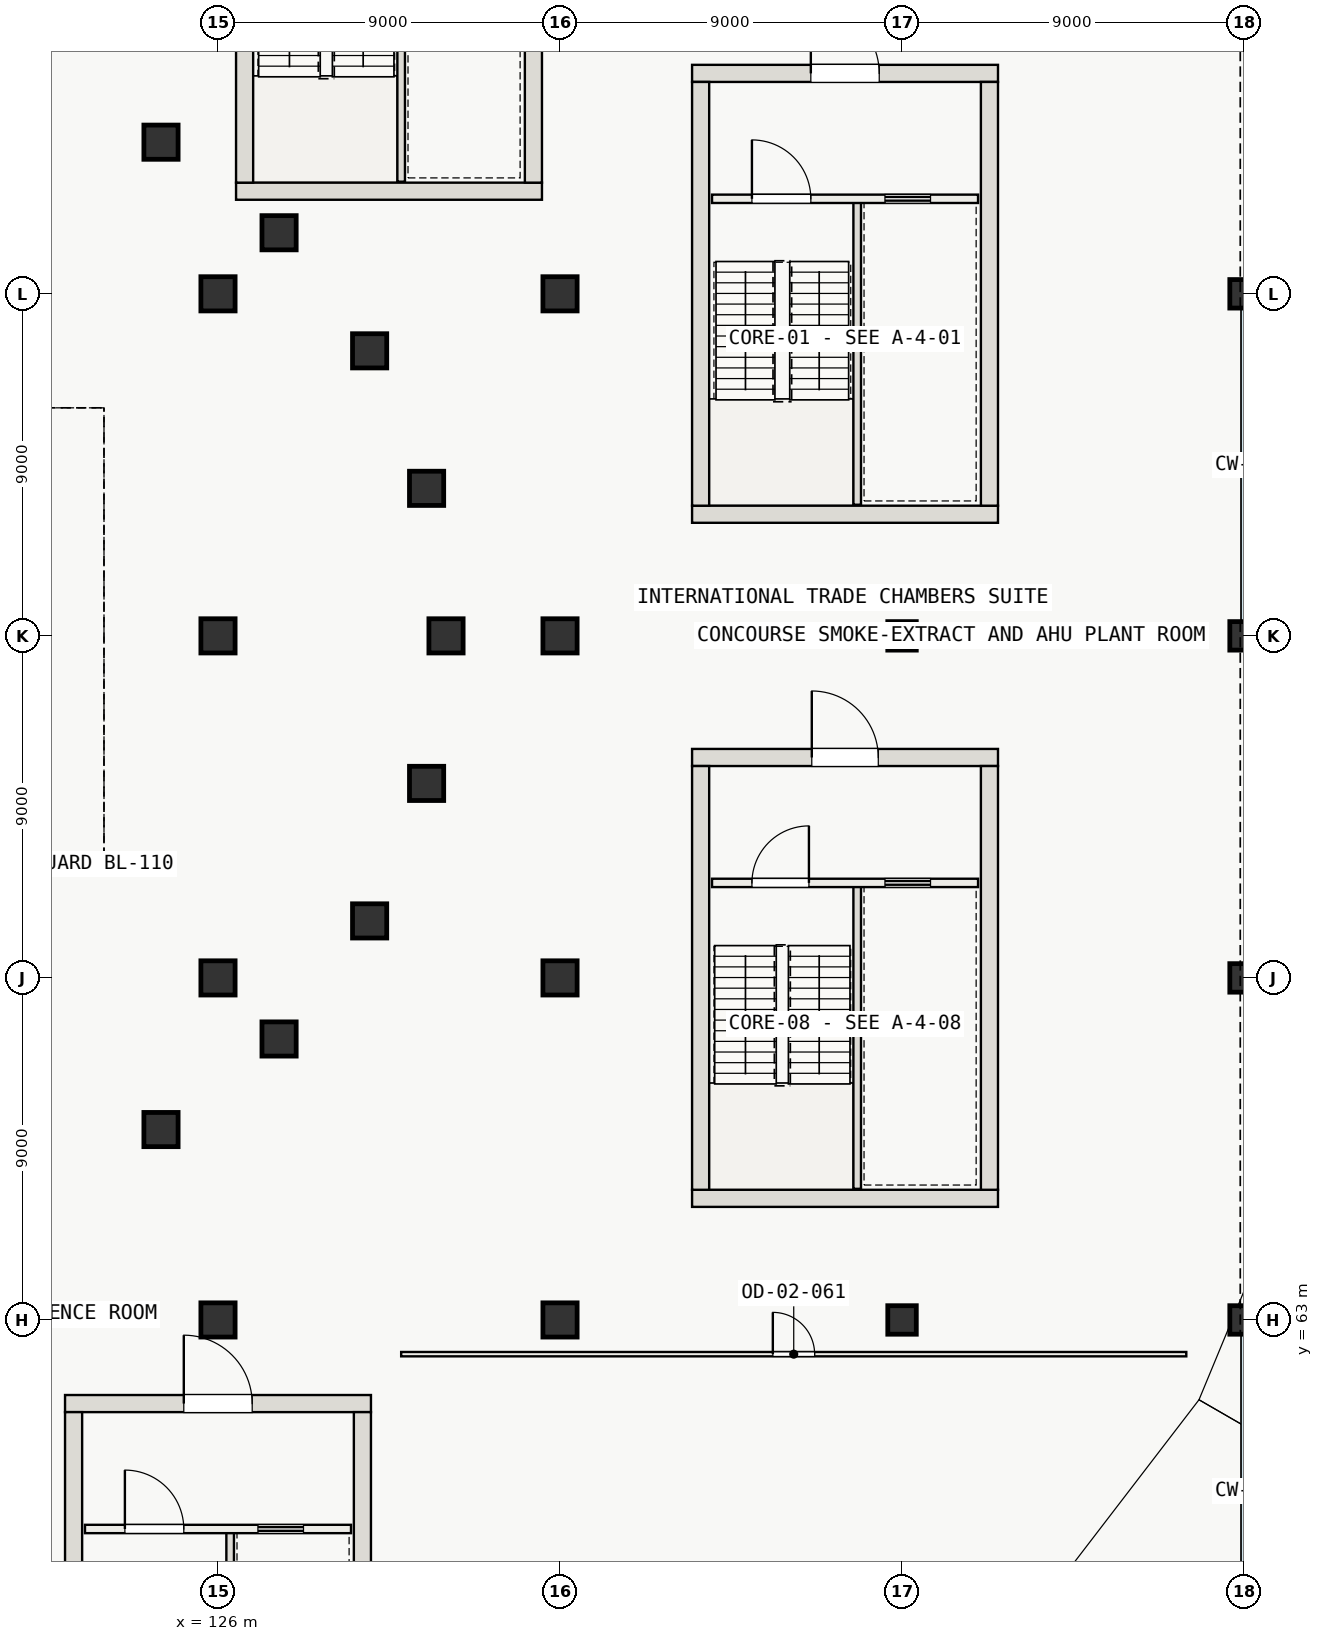
"""IFC4 building model, lengths in metres.
Left out: names, types, materials, properties, quantities, classifications, styles, units other than length and angle.
Written with IfcOpenShell. Run it as: python <this file> out.ifc"""

import sys

from ifc_helpers import new_model, si_unit, direction, frame, frame_2d, origin, origin_2d, place, context, subcontext, project, spatial, rectangle, circle, extrude, element, fill, save


model = new_model("IFC4")
c1 = context("Model", 3, precision=1e-05, world=origin(), true_north=direction((0.0, 1.0)))
c2 = subcontext(c1, "Body", "Model", "MODEL_VIEW")
j1 = project(units=[si_unit("LENGTHUNIT", "METRE"), si_unit("PLANEANGLEUNIT", "RADIAN")], contexts=[c1])
p1 = place(None, origin())
s1 = spatial("IfcSite", under=j1, at=p1, CompositionType="ELEMENT")
p2 = place(p1, origin())
s2 = spatial("IfcBuilding", under=s1, at=p2, CompositionType="ELEMENT")
p3 = place(p2, frame((0.0, 0.0, 16.8)))
s3 = spatial("IfcBuildingStorey", under=s2, at=p3, CompositionType="ELEMENT", Elevation=16.8)
p4 = place(p3, frame((138.475, 84.2, 0.0), z_axis=(0.0, 0.0, 1.0), x_axis=(1.0, 0.0, 0.0)))
e1 = element("IfcWall", 1, at=p4, inside=s3, PredefinedType="SHEAR", context=c2, shape_type="SweptSolid", body=[
    extrude(rectangle(XDim=8.05, YDim=0.45, at=frame_2d((4.025, 0.0))), origin(), (0.0, 0.0, 1.0), 4.8),
])
p5 = place(p3, frame((138.475, 95.8, 0.0), z_axis=(0.0, 0.0, 1.0), x_axis=(1.0, 0.0, 0.0)))
e2 = element("IfcWall", 2, at=p5, inside=s3, PredefinedType="SHEAR", context=c2, shape_type="SweptSolid", body=[
    extrude(rectangle(XDim=8.05, YDim=0.45, at=frame_2d((4.025, 0.0))), origin(), (0.0, 0.0, 1.0), 4.8),
])
p6 = place(p5, frame((3.125, 0.0, 0.0)))
e3 = element("IfcOpeningElement", 3, at=p6, cuts=e2, PredefinedType="OPENING", context=c2, shape_type="SweptSolid", body=[
    extrude(rectangle(XDim=1.8, YDim=2.3, at=frame_2d((0.9, 1.15))), frame((0.0, 0.235, 0.0), z_axis=(0.0, -1.0, 0.0), x_axis=(1.0, 0.0, 0.0)), (0.0, 0.0, 1.0), 0.47),
])
for number, where, z_axis, x_axis in (
    (4, (138.7, 84.425, 0.0), (0.0, 0.0, 1.0), (0.0, 1.0, 0.0)),
    (5, (146.3, 84.425, 0.0), (0.0, 0.0, 1.0), (0.0, 1.0, 0.0)),
):
    element("IfcWall", number, at=place(p3, frame(where, z_axis=z_axis, x_axis=x_axis)), inside=s3, PredefinedType="SHEAR", context=c2, shape_type="SweptSolid", body=[
        extrude(rectangle(XDim=11.15, YDim=0.45, at=frame_2d((5.575, 0.0))), origin(), (0.0, 0.0, 1.0), 4.8),
    ])
p7 = place(p3, frame((126.475, 92.7, 0.0), z_axis=(0.0, 0.0, 1.0), x_axis=(1.0, 0.0, 0.0)))
e6 = element("IfcWall", 6, at=p7, inside=s3, PredefinedType="SHEAR", context=c2, shape_type="SweptSolid", body=[
    extrude(rectangle(XDim=8.05, YDim=0.45, at=frame_2d((4.025, 0.0))), origin(), (0.0, 0.0, 1.0), 4.8),
])
for number, where, z_axis, x_axis in (
    (7, (126.7, 92.925, 0.0), (0.0, 0.0, 1.0), (0.0, 1.0, 0.0)),
    (8, (134.3, 92.925, 0.0), (0.0, 0.0, 1.0), (0.0, 1.0, 0.0)),
):
    element("IfcWall", number, at=place(p3, frame(where, z_axis=z_axis, x_axis=x_axis)), inside=s3, PredefinedType="SHEAR", context=c2, shape_type="SweptSolid", body=[
        extrude(rectangle(XDim=11.15, YDim=0.45, at=frame_2d((5.575, 0.0))), origin(), (0.0, 0.0, 1.0), 4.8),
    ])
p8 = place(p3, frame((121.975, 60.8, 0.0), z_axis=(0.0, 0.0, 1.0), x_axis=(1.0, 0.0, 0.0)))
e9 = element("IfcWall", 9, at=p8, inside=s3, PredefinedType="SHEAR", context=c2, shape_type="SweptSolid", body=[
    extrude(rectangle(XDim=8.05, YDim=0.45, at=frame_2d((4.025, 0.0))), origin(), (0.0, 0.0, 1.0), 4.8),
])
p9 = place(p8, frame((3.125, 0.0, 0.0)))
e10 = element("IfcOpeningElement", 10, at=p9, cuts=e9, PredefinedType="OPENING", context=c2, shape_type="SweptSolid", body=[
    extrude(rectangle(XDim=1.8, YDim=2.3, at=frame_2d((0.9, 1.15))), frame((0.0, 0.235, 0.0), z_axis=(0.0, -1.0, 0.0), x_axis=(1.0, 0.0, 0.0)), (0.0, 0.0, 1.0), 0.47),
])
for number, where, z_axis, x_axis in (
    (11, (122.2, 49.425, 0.0), (0.0, 0.0, 1.0), (0.0, 1.0, 0.0)),
    (12, (129.8, 49.425, 0.0), (0.0, 0.0, 1.0), (0.0, 1.0, 0.0)),
):
    element("IfcWall", number, at=place(p3, frame(where, z_axis=z_axis, x_axis=x_axis)), inside=s3, PredefinedType="SHEAR", context=c2, shape_type="SweptSolid", body=[
        extrude(rectangle(XDim=11.15, YDim=0.45, at=frame_2d((5.575, 0.0))), origin(), (0.0, 0.0, 1.0), 4.8),
    ])
p10 = place(p3, frame((138.475, 66.2, 0.0), z_axis=(0.0, 0.0, 1.0), x_axis=(1.0, 0.0, 0.0)))
e13 = element("IfcWall", 13, at=p10, inside=s3, PredefinedType="SHEAR", context=c2, shape_type="SweptSolid", body=[
    extrude(rectangle(XDim=8.05, YDim=0.45, at=frame_2d((4.025, 0.0))), origin(), (0.0, 0.0, 1.0), 4.8),
])
p11 = place(p3, frame((138.475, 77.8, 0.0), z_axis=(0.0, 0.0, 1.0), x_axis=(1.0, 0.0, 0.0)))
e14 = element("IfcWall", 14, at=p11, inside=s3, PredefinedType="SHEAR", context=c2, shape_type="SweptSolid", body=[
    extrude(rectangle(XDim=8.05, YDim=0.45, at=frame_2d((4.025, 0.0))), origin(), (0.0, 0.0, 1.0), 4.8),
])
p12 = place(p11, frame((3.15, 0.0, 0.0)))
e15 = element("IfcOpeningElement", 15, at=p12, cuts=e14, PredefinedType="OPENING", context=c2, shape_type="SweptSolid", body=[
    extrude(rectangle(XDim=1.75, YDim=2.3, at=frame_2d((0.875, 1.15))), frame((0.0, 0.235, 0.0), z_axis=(0.0, -1.0, 0.0), x_axis=(1.0, 0.0, 0.0)), (0.0, 0.0, 1.0), 0.47),
])
for number, where, z_axis, x_axis in (
    (16, (138.7, 66.425, 0.0), (0.0, 0.0, 1.0), (0.0, 1.0, 0.0)),
    (17, (146.3, 66.425, 0.0), (0.0, 0.0, 1.0), (0.0, 1.0, 0.0)),
):
    element("IfcWall", number, at=place(p3, frame(where, z_axis=z_axis, x_axis=x_axis)), inside=s3, PredefinedType="SHEAR", context=c2, shape_type="SweptSolid", body=[
        extrude(rectangle(XDim=11.15, YDim=0.45, at=frame_2d((5.575, 0.0))), origin(), (0.0, 0.0, 1.0), 4.8),
    ])
for number, where, z_axis, x_axis in (
    (18, (124.5, 68.01, 0.0), (0.0, 0.0, 1.0), (1.0, 0.0, 0.0)),
    (19, (124.5, 93.99, 0.0), (0.0, 0.0, 1.0), (1.0, 0.0, 0.0)),
):
    element("IfcColumn", number, at=place(p3, frame(where, z_axis=z_axis, x_axis=x_axis)), inside=s3, PredefinedType="COLUMN", context=c2, shape_type="SweptSolid", body=[
        extrude(circle(Radius=0.45, at=origin_2d()), origin(), (0.0, 0.0, 1.0), 4.45),
    ])
for number, where, z_axis, x_axis in (
    (20, (126.0, 63.0, 0.0), (0.0, 0.0, 1.0), (1.0, 0.0, 0.0)),
    (21, (126.0, 72.0, 0.0), (0.0, 0.0, 1.0), (1.0, 0.0, 0.0)),
    (22, (126.0, 81.0, 0.0), (0.0, 0.0, 1.0), (1.0, 0.0, 0.0)),
    (23, (126.0, 90.0, 0.0), (0.0, 0.0, 1.0), (1.0, 0.0, 0.0)),
):
    element("IfcColumn", number, at=place(p3, frame(where, z_axis=z_axis, x_axis=x_axis)), inside=s3, PredefinedType="COLUMN", context=c2, shape_type="SweptSolid", body=[
        extrude(rectangle(XDim=0.9, YDim=0.9, at=origin_2d()), origin(), (0.0, 0.0, 1.0), 4.8),
    ])
for number, where, z_axis, x_axis in (
    (24, (127.607, 70.393, 0.0), (0.0, 0.0, 1.0), (1.0, 0.0, 0.0)),
    (25, (127.607, 91.607, 0.0), (0.0, 0.0, 1.0), (1.0, 0.0, 0.0)),
    (26, (129.99, 73.5, 0.0), (0.0, 0.0, 1.0), (1.0, 0.0, 0.0)),
    (27, (129.99, 88.5, 0.0), (0.0, 0.0, 1.0), (1.0, 0.0, 0.0)),
    (28, (131.489, 77.118, 0.0), (0.0, 0.0, 1.0), (1.0, 0.0, 0.0)),
    (29, (131.489, 84.882, 0.0), (0.0, 0.0, 1.0), (1.0, 0.0, 0.0)),
    (30, (132.0, 81.0, 0.0), (0.0, 0.0, 1.0), (1.0, 0.0, 0.0)),
):
    element("IfcColumn", number, at=place(p3, frame(where, z_axis=z_axis, x_axis=x_axis)), inside=s3, PredefinedType="COLUMN", context=c2, shape_type="SweptSolid", body=[
        extrude(circle(Radius=0.45, at=origin_2d()), origin(), (0.0, 0.0, 1.0), 4.45),
    ])
for number, where, z_axis, x_axis in (
    (31, (135.0, 63.0, 0.0), (0.0, 0.0, 1.0), (1.0, 0.0, 0.0)),
    (32, (135.0, 72.0, 0.0), (0.0, 0.0, 1.0), (1.0, 0.0, 0.0)),
    (33, (135.0, 81.0, 0.0), (0.0, 0.0, 1.0), (1.0, 0.0, 0.0)),
    (34, (135.0, 90.0, 0.0), (0.0, 0.0, 1.0), (1.0, 0.0, 0.0)),
):
    element("IfcColumn", number, at=place(p3, frame(where, z_axis=z_axis, x_axis=x_axis)), inside=s3, PredefinedType="COLUMN", context=c2, shape_type="SweptSolid", body=[
        extrude(rectangle(XDim=0.9, YDim=0.9, at=origin_2d()), origin(), (0.0, 0.0, 1.0), 4.8),
    ])
for number, where, z_axis, x_axis in (
    (35, (144.0, 63.0, 0.0), (0.0, 0.0, 1.0), (1.0, 0.0, 0.0)),
    (36, (144.0, 81.0, 0.0), (0.0, 0.0, 1.0), (1.0, 0.0, 0.0)),
    (37, (153.0, 63.0, 0.0), (0.0, 0.0, 1.0), (1.0, 0.0, 0.0)),
    (38, (153.0, 72.0, 0.0), (0.0, 0.0, 1.0), (1.0, 0.0, 0.0)),
    (39, (153.0, 81.0, 0.0), (0.0, 0.0, 1.0), (1.0, 0.0, 0.0)),
    (40, (153.0, 90.0, 0.0), (0.0, 0.0, 1.0), (1.0, 0.0, 0.0)),
):
    element("IfcColumn", number, at=place(p3, frame(where, z_axis=z_axis, x_axis=x_axis)), inside=s3, PredefinedType="COLUMN", context=c2, shape_type="SweptSolid", body=[
        extrude(rectangle(XDim=0.75, YDim=0.75, at=origin_2d()), origin(), (0.0, 0.0, 1.0), 4.8),
    ])
p13 = place(p3, frame((142.82, 84.45, 0.0), z_axis=(0.0, 0.0, 1.0), x_axis=(0.0, 1.0, 0.0)))
e41 = element("IfcWall", 41, at=p13, inside=s3, PredefinedType="SOLIDWALL", context=c2, shape_type="SweptSolid", body=[
    extrude(rectangle(XDim=8.0, YDim=0.2, at=frame_2d((4.0, 0.0))), origin(), (0.0, 0.0, 1.0), 4.8),
])
p14 = place(p3, frame((139.0, 92.5, 0.0), z_axis=(0.0, 0.0, 1.0), x_axis=(1.0, 0.0, 0.0)))
e42 = element("IfcWall", 42, at=p14, inside=s3, PredefinedType="SOLIDWALL", context=c2, shape_type="SweptSolid", body=[
    extrude(rectangle(XDim=7.0, YDim=0.22, at=frame_2d((3.5, 0.0))), origin(), (0.0, 0.0, 1.0), 4.49),
])
p15 = place(p14, frame((1.05, 0.0, 0.0)))
e43 = element("IfcOpeningElement", 43, at=p15, cuts=e42, PredefinedType="OPENING", context=c2, shape_type="SweptSolid", body=[
    extrude(rectangle(XDim=1.55, YDim=2.2, at=frame_2d((0.775, 1.1))), frame((0.0, 0.12, 0.0), z_axis=(0.0, -1.0, 0.0), x_axis=(1.0, 0.0, 0.0)), (0.0, 0.0, 1.0), 0.24),
])
p16 = place(p14, frame((4.55, 0.0, 0.0)))
e44 = element("IfcOpeningElement", 44, at=p16, cuts=e42, PredefinedType="OPENING", context=c2, shape_type="SweptSolid", body=[
    extrude(rectangle(XDim=1.2, YDim=2.2, at=frame_2d((0.6, 1.1))), frame((0.0, 0.12, 0.0), z_axis=(0.0, -1.0, 0.0), x_axis=(1.0, 0.0, 0.0)), (0.0, 0.0, 1.0), 0.24),
])
for number, where, z_axis, x_axis in (
    (45, (130.82, 92.95, 0.0), (0.0, 0.0, 1.0), (0.0, 1.0, 0.0)),
    (46, (126.32, 49.45, 0.0), (0.0, 0.0, 1.0), (0.0, 1.0, 0.0)),
):
    element("IfcWall", number, at=place(p3, frame(where, z_axis=z_axis, x_axis=x_axis)), inside=s3, PredefinedType="SOLIDWALL", context=c2, shape_type="SweptSolid", body=[
        extrude(rectangle(XDim=8.0, YDim=0.2, at=frame_2d((4.0, 0.0))), origin(), (0.0, 0.0, 1.0), 4.8),
    ])
p17 = place(p3, frame((122.5, 57.5, 0.0), z_axis=(0.0, 0.0, 1.0), x_axis=(1.0, 0.0, 0.0)))
e47 = element("IfcWall", 47, at=p17, inside=s3, PredefinedType="SOLIDWALL", context=c2, shape_type="SweptSolid", body=[
    extrude(rectangle(XDim=7.0, YDim=0.22, at=frame_2d((3.5, 0.0))), origin(), (0.0, 0.0, 1.0), 4.49),
])
p18 = place(p17, frame((1.05, 0.0, 0.0)))
e48 = element("IfcOpeningElement", 48, at=p18, cuts=e47, PredefinedType="OPENING", context=c2, shape_type="SweptSolid", body=[
    extrude(rectangle(XDim=1.55, YDim=2.2, at=frame_2d((0.775, 1.1))), frame((0.0, 0.12, 0.0), z_axis=(0.0, -1.0, 0.0), x_axis=(1.0, 0.0, 0.0)), (0.0, 0.0, 1.0), 0.24),
])
p19 = place(p17, frame((4.55, 0.0, 0.0)))
e49 = element("IfcOpeningElement", 49, at=p19, cuts=e47, PredefinedType="OPENING", context=c2, shape_type="SweptSolid", body=[
    extrude(rectangle(XDim=1.2, YDim=2.2, at=frame_2d((0.6, 1.1))), frame((0.0, 0.12, 0.0), z_axis=(0.0, -1.0, 0.0), x_axis=(1.0, 0.0, 0.0)), (0.0, 0.0, 1.0), 0.24),
])
p20 = place(p3, frame((142.82, 66.45, 0.0), z_axis=(0.0, 0.0, 1.0), x_axis=(0.0, 1.0, 0.0)))
e50 = element("IfcWall", 50, at=p20, inside=s3, PredefinedType="SOLIDWALL", context=c2, shape_type="SweptSolid", body=[
    extrude(rectangle(XDim=8.0, YDim=0.2, at=frame_2d((4.0, 0.0))), origin(), (0.0, 0.0, 1.0), 4.8),
])
p21 = place(p3, frame((139.0, 74.5, 0.0), z_axis=(0.0, 0.0, 1.0), x_axis=(1.0, 0.0, 0.0)))
e51 = element("IfcWall", 51, at=p21, inside=s3, PredefinedType="SOLIDWALL", context=c2, shape_type="SweptSolid", body=[
    extrude(rectangle(XDim=7.0, YDim=0.22, at=frame_2d((3.5, 0.0))), origin(), (0.0, 0.0, 1.0), 4.49),
])
p22 = place(p21, frame((1.05, 0.0, 0.0)))
e52 = element("IfcOpeningElement", 52, at=p22, cuts=e51, PredefinedType="OPENING", context=c2, shape_type="SweptSolid", body=[
    extrude(rectangle(XDim=1.5, YDim=2.2, at=frame_2d((0.75, 1.1))), frame((0.0, 0.12, 0.0), z_axis=(0.0, -1.0, 0.0), x_axis=(1.0, 0.0, 0.0)), (0.0, 0.0, 1.0), 0.24),
])
p23 = place(p21, frame((4.55, 0.0, 0.0)))
e53 = element("IfcOpeningElement", 53, at=p23, cuts=e51, PredefinedType="OPENING", context=c2, shape_type="SweptSolid", body=[
    extrude(rectangle(XDim=1.2, YDim=2.2, at=frame_2d((0.6, 1.1))), frame((0.0, 0.12, 0.0), z_axis=(0.0, -1.0, 0.0), x_axis=(1.0, 0.0, 0.0)), (0.0, 0.0, 1.0), 0.24),
])
p24 = place(p3, frame((130.82, 62.1, 0.0), z_axis=(0.0, 0.0, 1.0), x_axis=(1.0, 0.0, 0.0)))
e54 = element("IfcWall", 54, at=p24, inside=s3, PredefinedType="PARTITIONING", context=c2, shape_type="SweptSolid", body=[
    extrude(rectangle(XDim=20.66, YDim=0.115, at=frame_2d((10.33, 0.0))), origin(), (0.0, 0.0, 1.0), 3.5),
])
p25 = place(p24, frame((9.78, 0.0, 0.0)))
e55 = element("IfcOpeningElement", 55, at=p25, cuts=e54, PredefinedType="OPENING", context=c2, shape_type="SweptSolid", body=[
    extrude(rectangle(XDim=1.1, YDim=2.2, at=frame_2d((0.55, 1.1))), frame((0.0, 0.067, 0.0), z_axis=(0.0, -1.0, 0.0), x_axis=(1.0, 0.0, 0.0)), (0.0, 0.0, 1.0), 0.135),
])
p26 = place(p15, origin())
e56 = element("IfcDoor", 56, at=p26, inside=s3, OperationType="SINGLE_SWING_LEFT", PredefinedType="DOOR", context=c2, shape_type="SweptSolid", body=[
    extrude(rectangle(XDim=1.55, YDim=2.2, at=frame_2d((0.775, 1.1))), frame((0.0, 0.025, 0.0), z_axis=(0.0, -1.0, 0.0), x_axis=(1.0, 0.0, 0.0)), (0.0, 0.0, 1.0), 0.05),
])
fill(e43, e56)
p27 = place(p16, origin())
e57 = element("IfcDoor", 57, at=p27, inside=s3, OperationType="SLIDING_TO_LEFT", PredefinedType="DOOR", context=c2, shape_type="SweptSolid", body=[
    extrude(rectangle(XDim=1.2, YDim=2.2, at=frame_2d((0.6, 1.1))), frame((0.0, 0.025, 0.0), z_axis=(0.0, -1.0, 0.0), x_axis=(1.0, 0.0, 0.0)), (0.0, 0.0, 1.0), 0.05),
])
fill(e44, e57)
p28 = place(p6, origin())
e58 = element("IfcDoor", 58, at=p28, inside=s3, OperationType="DOUBLE_DOOR_SINGLE_SWING", PredefinedType="DOOR", context=c2, shape_type="SweptSolid", body=[
    extrude(rectangle(XDim=1.8, YDim=2.3, at=frame_2d((0.9, 1.15))), frame((0.0, 0.025, 0.0), z_axis=(0.0, -1.0, 0.0), x_axis=(1.0, 0.0, 0.0)), (0.0, 0.0, 1.0), 0.05),
])
fill(e3, e58)
p29 = place(p18, origin())
e59 = element("IfcDoor", 59, at=p29, inside=s3, OperationType="SINGLE_SWING_LEFT", PredefinedType="DOOR", context=c2, shape_type="SweptSolid", body=[
    extrude(rectangle(XDim=1.55, YDim=2.2, at=frame_2d((0.775, 1.1))), frame((0.0, 0.025, 0.0), z_axis=(0.0, -1.0, 0.0), x_axis=(1.0, 0.0, 0.0)), (0.0, 0.0, 1.0), 0.05),
])
fill(e48, e59)
p30 = place(p19, origin())
e60 = element("IfcDoor", 60, at=p30, inside=s3, OperationType="SLIDING_TO_LEFT", PredefinedType="DOOR", context=c2, shape_type="SweptSolid", body=[
    extrude(rectangle(XDim=1.2, YDim=2.2, at=frame_2d((0.6, 1.1))), frame((0.0, 0.025, 0.0), z_axis=(0.0, -1.0, 0.0), x_axis=(1.0, 0.0, 0.0)), (0.0, 0.0, 1.0), 0.05),
])
fill(e49, e60)
p31 = place(p9, origin())
e61 = element("IfcDoor", 61, at=p31, inside=s3, OperationType="DOUBLE_DOOR_SINGLE_SWING", PredefinedType="DOOR", context=c2, shape_type="SweptSolid", body=[
    extrude(rectangle(XDim=1.8, YDim=2.3, at=frame_2d((0.9, 1.15))), frame((0.0, 0.025, 0.0), z_axis=(0.0, -1.0, 0.0), x_axis=(1.0, 0.0, 0.0)), (0.0, 0.0, 1.0), 0.05),
])
fill(e10, e61)
p32 = place(p22, origin())
e62 = element("IfcDoor", 62, at=p32, inside=s3, OperationType="SINGLE_SWING_RIGHT", PredefinedType="DOOR", context=c2, shape_type="SweptSolid", body=[
    extrude(rectangle(XDim=1.5, YDim=2.2, at=frame_2d((0.75, 1.1))), frame((0.0, 0.025, 0.0), z_axis=(0.0, -1.0, 0.0), x_axis=(1.0, 0.0, 0.0)), (0.0, 0.0, 1.0), 0.05),
])
fill(e52, e62)
p33 = place(p23, origin())
e63 = element("IfcDoor", 63, at=p33, inside=s3, OperationType="SLIDING_TO_RIGHT", PredefinedType="DOOR", context=c2, shape_type="SweptSolid", body=[
    extrude(rectangle(XDim=1.2, YDim=2.2, at=frame_2d((0.6, 1.1))), frame((0.0, 0.025, 0.0), z_axis=(0.0, -1.0, 0.0), x_axis=(1.0, 0.0, 0.0)), (0.0, 0.0, 1.0), 0.05),
])
fill(e53, e63)
p34 = place(p12, origin())
e64 = element("IfcDoor", 64, at=p34, inside=s3, OperationType="DOUBLE_DOOR_SINGLE_SWING", PredefinedType="DOOR", context=c2, shape_type="SweptSolid", body=[
    extrude(rectangle(XDim=1.75, YDim=2.3, at=frame_2d((0.875, 1.15))), frame((0.0, 0.025, 0.0), z_axis=(0.0, -1.0, 0.0), x_axis=(1.0, 0.0, 0.0)), (0.0, 0.0, 1.0), 0.05),
])
fill(e15, e64)
p35 = place(p25, origin())
e65 = element("IfcDoor", 65, at=p35, inside=s3, OperationType="SINGLE_SWING_LEFT", PredefinedType="DOOR", context=c2, shape_type="SweptSolid", body=[
    extrude(rectangle(XDim=1.1, YDim=2.2, at=frame_2d((0.55, 1.1))), frame((0.0, 0.025, 0.0), z_axis=(0.0, -1.0, 0.0), x_axis=(1.0, 0.0, 0.0)), (0.0, 0.0, 1.0), 0.05),
])
fill(e55, e65)
save(model, sys.argv[1])
